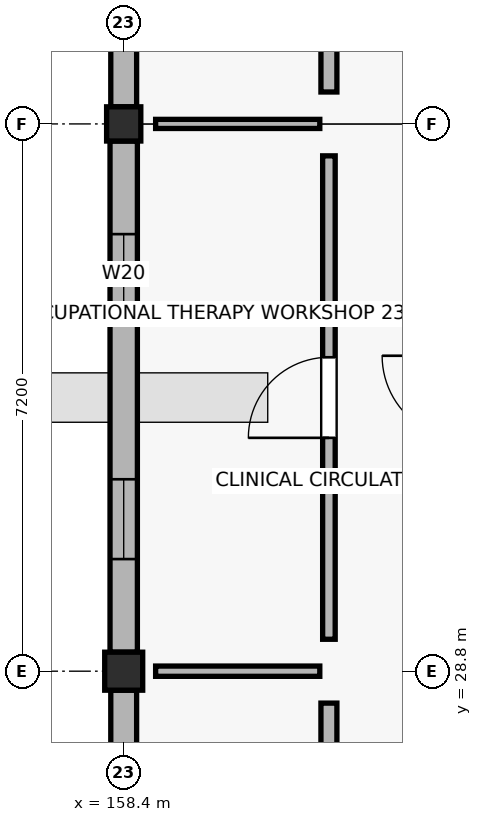
"""IFC4 building model, lengths in metres.
Left out: names, types, materials, properties, quantities, classifications, styles, units other than length and angle.
Written with IfcOpenShell. Run it as: python <this file> out.ifc"""

import sys

from ifc_helpers import new_model, si_unit, direction, frame, frame_2d, origin, origin_2d, place, context, subcontext, project, spatial, rectangle, extrude, element, fill, save


model = new_model("IFC4")
c1 = context("Model", 3, precision=1e-05, world=origin(), true_north=direction((0.0, 1.0)))
c2 = subcontext(c1, "Body", "Model", "MODEL_VIEW")
j1 = project(units=[si_unit("LENGTHUNIT", "METRE"), si_unit("PLANEANGLEUNIT", "RADIAN")], contexts=[c1])
p1 = place(None, origin())
s1 = spatial("IfcSite", under=j1, at=p1, CompositionType="ELEMENT")
p2 = place(p1, origin())
s2 = spatial("IfcBuilding", under=s1, at=p2, CompositionType="ELEMENT")
p3 = place(p2, frame((0.0, 0.0, 4.5)))
s3 = spatial("IfcBuildingStorey", under=s2, at=p3, CompositionType="ELEMENT", Elevation=4.5)
p4 = place(p3, frame((158.4, 28.8, 0.0), z_axis=(0.0, 0.0, 1.0), x_axis=(1.0, 0.0, 0.0)))
e1 = element("IfcColumn", 1, at=p4, inside=s3, PredefinedType="COLUMN", context=c2, shape_type="SweptSolid", body=[
    extrude(rectangle(XDim=0.5, YDim=0.5, at=origin_2d()), origin(), (0.0, 0.0, 1.0), 4.28),
])
p5 = place(p3, frame((158.4, 36.0, 0.0), z_axis=(0.0, 0.0, 1.0), x_axis=(1.0, 0.0, 0.0)))
e2 = element("IfcColumn", 2, at=p5, inside=s3, PredefinedType="COLUMN", context=c2, shape_type="SweptSolid", body=[
    extrude(rectangle(XDim=0.45, YDim=0.45, at=origin_2d()), origin(), (0.0, 0.0, 1.0), 4.28),
])
p6 = place(p3, frame((158.4, 28.55, 0.0), z_axis=(0.0, 0.0, 1.0), x_axis=(0.0, -1.0, 0.0)))
e3 = element("IfcWall", 3, at=p6, inside=s3, PredefinedType="SOLIDWALL", context=c2, shape_type="SweptSolid", body=[
    extrude(rectangle(XDim=6.725, YDim=0.34, at=frame_2d((3.363, 0.0))), origin(), (0.0, 0.0, 1.0), 3.52),
])
p7 = place(p6, frame((0.925, 0.0, 0.9)))
e4 = element("IfcOpeningElement", 4, at=p7, cuts=e3, PredefinedType="OPENING", context=c2, shape_type="SweptSolid", body=[
    extrude(rectangle(XDim=1.65, YDim=1.38, at=frame_2d((0.825, 0.69))), frame((0.0, 0.18, 0.0), z_axis=(0.0, -1.0, 0.0), x_axis=(1.0, 0.0, 0.0)), (0.0, 0.0, 1.0), 0.36),
])
p8 = place(p6, frame((4.15, 0.0, 0.9)))
e5 = element("IfcOpeningElement", 5, at=p8, cuts=e3, PredefinedType="OPENING", context=c2, shape_type="SweptSolid", body=[
    extrude(rectangle(XDim=1.65, YDim=1.38, at=frame_2d((0.825, 0.69))), frame((0.0, 0.18, 0.0), z_axis=(0.0, -1.0, 0.0), x_axis=(1.0, 0.0, 0.0)), (0.0, 0.0, 1.0), 0.36),
])
p9 = place(p3, frame((158.4, 35.775, 0.0), z_axis=(0.0, 0.0, 1.0), x_axis=(0.0, -1.0, 0.0)))
e6 = element("IfcWall", 6, at=p9, inside=s3, PredefinedType="SOLIDWALL", context=c2, shape_type="SweptSolid", body=[
    extrude(rectangle(XDim=6.725, YDim=0.36, at=frame_2d((3.362, 0.0))), origin(), (0.0, 0.0, 1.0), 3.52),
])
p10 = place(p9, frame((1.225, 0.0, 0.9)))
e7 = element("IfcOpeningElement", 7, at=p10, cuts=e6, PredefinedType="OPENING", context=c2, shape_type="SweptSolid", body=[
    extrude(rectangle(XDim=1.05, YDim=1.5, at=frame_2d((0.525, 0.75))), frame((0.0, 0.19, 0.0), z_axis=(0.0, -1.0, 0.0), x_axis=(1.0, 0.0, 0.0)), (0.0, 0.0, 1.0), 0.38),
])
p11 = place(p9, frame((4.45, 0.0, 0.9)))
e8 = element("IfcOpeningElement", 8, at=p11, cuts=e6, PredefinedType="OPENING", context=c2, shape_type="SweptSolid", body=[
    extrude(rectangle(XDim=1.05, YDim=1.5, at=frame_2d((0.525, 0.75))), frame((0.0, 0.19, 0.0), z_axis=(0.0, -1.0, 0.0), x_axis=(1.0, 0.0, 0.0)), (0.0, 0.0, 1.0), 0.38),
])
p12 = place(p3, frame((158.4, 42.95, 0.0), z_axis=(0.0, 0.0, 1.0), x_axis=(0.0, -1.0, 0.0)))
e9 = element("IfcWall", 9, at=p12, inside=s3, PredefinedType="SOLIDWALL", context=c2, shape_type="SweptSolid", body=[
    extrude(rectangle(XDim=6.725, YDim=0.34, at=frame_2d((3.362, 0.0))), origin(), (0.0, 0.0, 1.0), 3.52),
])
p13 = place(p12, frame((0.85, 0.0, 0.9)))
e10 = element("IfcOpeningElement", 10, at=p13, cuts=e9, PredefinedType="OPENING", context=c2, shape_type="SweptSolid", body=[
    extrude(rectangle(XDim=1.8, YDim=1.5, at=frame_2d((0.9, 0.75))), frame((0.0, 0.18, 0.0), z_axis=(0.0, -1.0, 0.0), x_axis=(1.0, 0.0, 0.0)), (0.0, 0.0, 1.0), 0.36),
])
p14 = place(p12, frame((4.075, 0.0, 0.9)))
e11 = element("IfcOpeningElement", 11, at=p14, cuts=e9, PredefinedType="OPENING", context=c2, shape_type="SweptSolid", body=[
    extrude(rectangle(XDim=1.8, YDim=1.5, at=frame_2d((0.9, 0.75))), frame((0.0, 0.18, 0.0), z_axis=(0.0, -1.0, 0.0), x_axis=(1.0, 0.0, 0.0)), (0.0, 0.0, 1.0), 0.36),
])
p15 = place(p3, frame((161.1, 22.02, 0.0), z_axis=(0.0, 0.0, 1.0), x_axis=(0.0, 1.0, 0.0)))
e12 = element("IfcWall", 12, at=p15, inside=s3, PredefinedType="PLUMBINGWALL", context=c2, shape_type="SweptSolid", body=[
    extrude(rectangle(XDim=6.36, YDim=0.21, at=frame_2d((3.18, 0.0))), origin(), (0.0, 0.0, 1.0), 3.36),
])
p16 = place(p15, frame((2.69, 0.0, 0.0)))
e13 = element("IfcOpeningElement", 13, at=p16, cuts=e12, PredefinedType="OPENING", context=c2, shape_type="SweptSolid", body=[
    extrude(rectangle(XDim=0.98, YDim=2.14, at=frame_2d((0.49, 1.07))), frame((0.0, 0.115, 0.0), z_axis=(0.0, -1.0, 0.0), x_axis=(1.0, 0.0, 0.0)), (0.0, 0.0, 1.0), 0.23),
])
p17 = place(p3, frame((158.82, 28.8, 0.0), z_axis=(0.0, 0.0, 1.0), x_axis=(1.0, 0.0, 0.0)))
e14 = element("IfcWall", 14, at=p17, inside=s3, PredefinedType="PARTITIONING", context=c2, shape_type="SweptSolid", body=[
    extrude(rectangle(XDim=2.16, YDim=0.135, at=frame_2d((1.08, 0.0))), origin(), (0.0, 0.0, 1.0), 3.36),
])
p18 = place(p3, frame((161.1, 29.22, 0.0), z_axis=(0.0, 0.0, 1.0), x_axis=(0.0, 1.0, 0.0)))
e15 = element("IfcWall", 15, at=p18, inside=s3, PredefinedType="PARTITIONING", context=c2, shape_type="SweptSolid", body=[
    extrude(rectangle(XDim=6.36, YDim=0.165, at=frame_2d((3.18, 0.0))), origin(), (0.0, 0.0, 1.0), 3.36),
])
p19 = place(p18, frame((2.65, 0.0, 0.0)))
e16 = element("IfcOpeningElement", 16, at=p19, cuts=e15, PredefinedType="OPENING", context=c2, shape_type="SweptSolid", body=[
    extrude(rectangle(XDim=1.06, YDim=2.14, at=frame_2d((0.53, 1.07))), frame((0.0, 0.093, 0.0), z_axis=(0.0, -1.0, 0.0), x_axis=(1.0, 0.0, 0.0)), (0.0, 0.0, 1.0), 0.185),
])
p20 = place(p3, frame((158.82, 36.0, 0.0), z_axis=(0.0, 0.0, 1.0), x_axis=(1.0, 0.0, 0.0)))
e17 = element("IfcWall", 17, at=p20, inside=s3, PredefinedType="PARTITIONING", context=c2, shape_type="SweptSolid", body=[
    extrude(rectangle(XDim=2.16, YDim=0.12, at=frame_2d((1.08, 0.0))), origin(), (0.0, 0.0, 1.0), 3.36),
])
p21 = place(p3, frame((161.1, 36.42, 0.0), z_axis=(0.0, 0.0, 1.0), x_axis=(0.0, 1.0, 0.0)))
e18 = element("IfcWall", 18, at=p21, inside=s3, PredefinedType="PLUMBINGWALL", context=c2, shape_type="SweptSolid", body=[
    extrude(rectangle(XDim=6.36, YDim=0.21, at=frame_2d((3.18, 0.0))), origin(), (0.0, 0.0, 1.0), 3.36),
])
p22 = place(p21, frame((2.61, 0.0, 0.0)))
e19 = element("IfcOpeningElement", 19, at=p22, cuts=e18, PredefinedType="OPENING", context=c2, shape_type="SweptSolid", body=[
    extrude(rectangle(XDim=1.14, YDim=2.14, at=frame_2d((0.57, 1.07))), frame((0.0, 0.115, 0.0), z_axis=(0.0, -1.0, 0.0), x_axis=(1.0, 0.0, 0.0)), (0.0, 0.0, 1.0), 0.23),
])
p23 = place(p10, origin())
e20 = element("IfcWindow", 20, at=p23, inside=s3, PartitioningType="SINGLE_PANEL", PredefinedType="WINDOW", context=c2, shape_type="SweptSolid", body=[
    extrude(rectangle(XDim=1.05, YDim=1.5, at=frame_2d((0.525, 0.75))), frame((0.0, 0.03, 0.0), z_axis=(0.0, -1.0, 0.0), x_axis=(1.0, 0.0, 0.0)), (0.0, 0.0, 1.0), 0.06),
])
fill(e7, e20)
p24 = place(p11, origin())
e21 = element("IfcWindow", 21, at=p24, inside=s3, PartitioningType="SINGLE_PANEL", PredefinedType="WINDOW", context=c2, shape_type="SweptSolid", body=[
    extrude(rectangle(XDim=1.05, YDim=1.5, at=frame_2d((0.525, 0.75))), frame((0.0, 0.03, 0.0), z_axis=(0.0, -1.0, 0.0), x_axis=(1.0, 0.0, 0.0)), (0.0, 0.0, 1.0), 0.06),
])
fill(e8, e21)
p25 = place(p19, origin())
e22 = element("IfcDoor", 22, at=p25, inside=s3, OperationType="SINGLE_SWING_LEFT", PredefinedType="DOOR", context=c2, shape_type="SweptSolid", body=[
    extrude(rectangle(XDim=1.06, YDim=2.14, at=frame_2d((0.53, 1.07))), frame((0.0, 0.025, 0.0), z_axis=(0.0, -1.0, 0.0), x_axis=(1.0, 0.0, 0.0)), (0.0, 0.0, 1.0), 0.05),
])
fill(e16, e22)
save(model, sys.argv[1])
